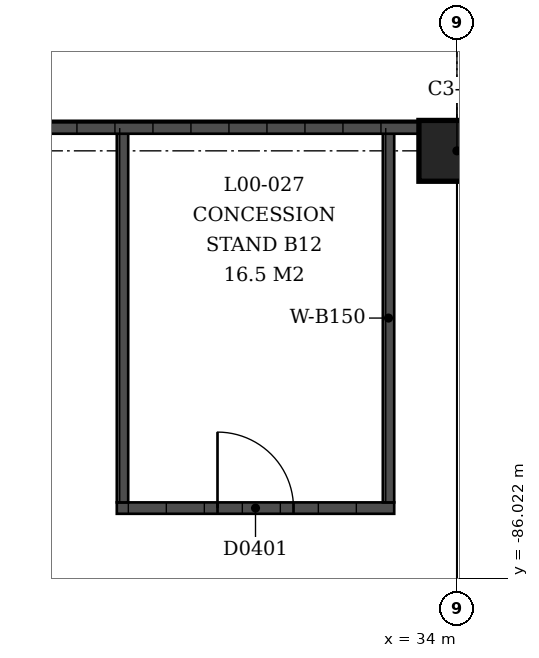
"""IFC4 building model, lengths in metres.
Left out: names, types, materials, properties, quantities, classifications, styles, units other than length and angle.
Written with IfcOpenShell. Run it as: python <this file> out.ifc"""

import sys

from ifc_helpers import new_model, si_unit, direction, frame, frame_2d, origin, origin_2d, place, context, subcontext, project, spatial, rectangle, extrude, element, fill, save


model = new_model("IFC4")
c1 = context("Model", 3, precision=1e-05, world=origin(), true_north=direction((0.0, 1.0)))
c2 = subcontext(c1, "Body", "Model", "MODEL_VIEW")
j1 = project(units=[si_unit("LENGTHUNIT", "METRE"), si_unit("PLANEANGLEUNIT", "RADIAN")], contexts=[c1])
p1 = place(None, origin())
s1 = spatial("IfcSite", under=j1, at=p1, CompositionType="ELEMENT")
p2 = place(p1, origin())
s2 = spatial("IfcBuilding", under=s1, at=p2, CompositionType="ELEMENT")
p3 = place(p2, origin())
s3 = spatial("IfcBuildingStorey", under=s2, at=p3, CompositionType="ELEMENT", Elevation=0.0)
p4 = place(p3, frame((34.0, -80.4, 0.0), z_axis=(0.0, 0.0, 1.0), x_axis=(1.0, 0.0, 0.0)))
e1 = element("IfcColumn", 1, at=p4, inside=s3, PredefinedType="COLUMN", context=c2, shape_type="SweptSolid", body=[
    extrude(rectangle(XDim=1.0, YDim=0.8, at=origin_2d()), origin(), (0.0, 0.0, 1.0), 4.5),
])
p5 = place(p3, frame((33.175, -85.1, 0.0), z_axis=(0.0, 0.0, 1.0), x_axis=(-1.0, 0.0, 0.0)))
e2 = element("IfcWall", 2, at=p5, inside=s3, PredefinedType="SOLIDWALL", context=c2, shape_type="SweptSolid", body=[
    extrude(rectangle(XDim=3.65, YDim=0.15, at=frame_2d((1.825, 0.0))), origin(), (0.0, 0.0, 1.0), 3.0),
])
p6 = place(p5, frame((1.325, 0.0, 0.0)))
e3 = element("IfcOpeningElement", 3, at=p6, cuts=e2, PredefinedType="OPENING", context=c2, shape_type="SweptSolid", body=[
    extrude(rectangle(XDim=1.0, YDim=2.1, at=frame_2d((0.5, 1.05))), frame((0.0, 0.075, 0.0), z_axis=(0.0, -1.0, 0.0), x_axis=(1.0, 0.0, 0.0)), (0.0, 0.0, 1.0), 0.15),
])
for number, where, z_axis, x_axis in (
    (4, (33.1, -80.1, 0.0), (0.0, 0.0, 1.0), (0.0, -1.0, 0.0)),
    (5, (29.6, -80.1, 0.0), (0.0, 0.0, 1.0), (0.0, -1.0, 0.0)),
):
    element("IfcWall", number, at=place(p3, frame(where, z_axis=z_axis, x_axis=x_axis)), inside=s3, PredefinedType="SOLIDWALL", context=c2, shape_type="SweptSolid", body=[
        extrude(rectangle(XDim=4.925, YDim=0.15, at=frame_2d((2.462, 0.0))), origin(), (0.0, 0.0, 1.0), 3.0),
    ])
p7 = place(p3, frame((33.5, -80.1, 0.0), z_axis=(0.0, 0.0, 1.0), x_axis=(-1.0, 0.0, 0.0)))
e6 = element("IfcWall", 6, at=p7, inside=s3, PredefinedType="SOLIDWALL", context=c2, shape_type="SweptSolid", body=[
    extrude(rectangle(XDim=12.7, YDim=0.15, at=frame_2d((6.35, 0.0))), origin(), (0.0, 0.0, 1.0), 3.0),
])
p8 = place(p6, origin())
e7 = element("IfcDoor", 7, at=p8, inside=s3, OperationType="SINGLE_SWING_RIGHT", PredefinedType="DOOR", context=c2, shape_type="SweptSolid", body=[
    extrude(rectangle(XDim=1.0, YDim=2.1, at=frame_2d((0.5, 1.05))), frame((0.0, 0.025, 0.0), z_axis=(0.0, -1.0, 0.0), x_axis=(1.0, 0.0, 0.0)), (0.0, 0.0, 1.0), 0.05),
])
fill(e3, e7)
save(model, sys.argv[1])
